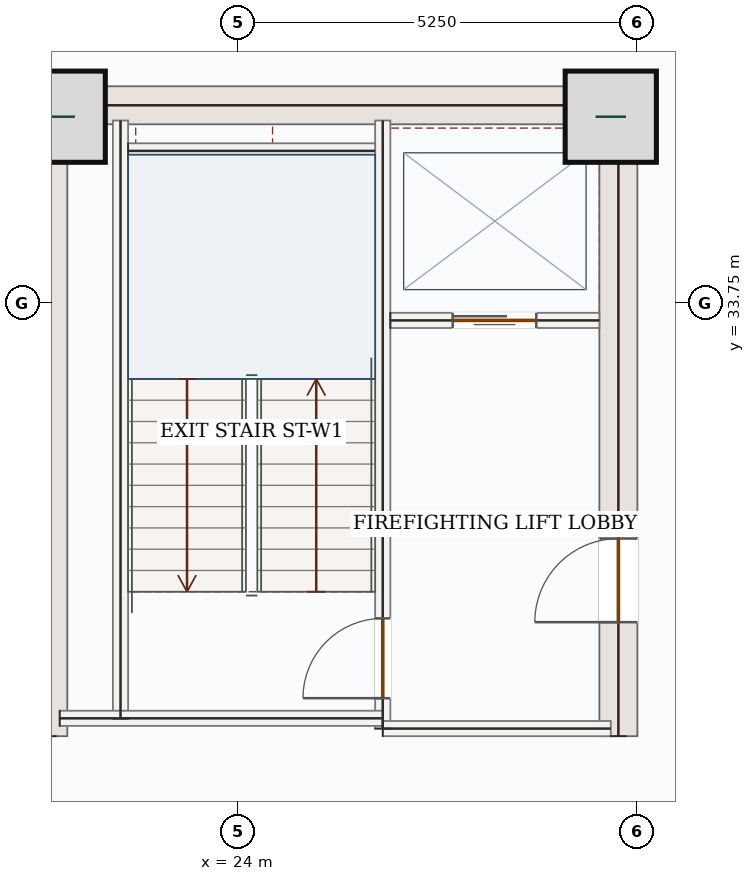
"""IFC4 building model, lengths in metres.
Left out: names, types, materials, properties, quantities, classifications, styles, units other than length and angle.
Written with IfcOpenShell. Run it as: python <this file> out.ifc"""

import sys

from ifc_helpers import new_model, si_unit, direction, frame, frame_2d, origin, origin_2d, place, context, subcontext, project, spatial, rectangle, extrude, source, transform, mapped, element, fill, save


model = new_model("IFC4")
c1 = context("Model", 3, precision=1e-05, world=origin(), true_north=direction((0.0, 1.0)))
c2 = subcontext(c1, "Body", "Model", "MODEL_VIEW")
j1 = project(units=[si_unit("LENGTHUNIT", "METRE"), si_unit("PLANEANGLEUNIT", "RADIAN")], contexts=[c1])
p1 = place(None, origin())
s1 = spatial("IfcSite", under=j1, at=p1, CompositionType="ELEMENT")
p2 = place(p1, origin())
s2 = spatial("IfcBuilding", under=s1, at=p2, CompositionType="ELEMENT")
p3 = place(p2, frame((0.0, 0.0, 186.3)))
s3 = spatial("IfcBuildingStorey", under=s2, at=p3, CompositionType="ELEMENT", Elevation=186.3)
m1 = source(origin(), c2, "Body", "SweptSolid", [
    extrude(rectangle(XDim=8.55, YDim=0.5, at=frame_2d((4.275, 0.0))), origin(), (0.0, 0.0, 1.0), 3.62),
])
p4 = place(p3, frame((21.5, 28.05, 0.0), z_axis=(0.0, 0.0, 1.0), x_axis=(0.0, 1.0, 0.0)))
e1 = element("IfcWall", 1, at=p4, inside=s3, PredefinedType="SHEAR", context=c2, shape_type="MappedRepresentation", body=[
    mapped(m1, transform((0.0, 0.0, 0.0), x_axis=(1.0, 0.0, 0.0), y_axis=(0.0, 1.0, 0.0), z_axis=(0.0, 0.0, 1.0), scale=1.0)),
])
p5 = place(p3, frame((29.0, 28.05, 0.0), z_axis=(0.0, 0.0, 1.0), x_axis=(0.0, 1.0, 0.0)))
e2 = element("IfcWall", 2, at=p5, inside=s3, PredefinedType="SHEAR", context=c2, shape_type="SweptSolid", body=[
    extrude(rectangle(XDim=8.55, YDim=0.5, at=frame_2d((4.275, 0.0))), origin(), (0.0, 0.0, 1.0), 3.62),
])
p6 = place(p5, frame((1.5, 0.0, 0.0)))
e3 = element("IfcOpeningElement", 3, at=p6, cuts=e2, PredefinedType="OPENING", context=c2, shape_type="SweptSolid", body=[
    extrude(rectangle(XDim=1.1, YDim=2.2, at=frame_2d((0.55, 1.1))), frame((0.0, 0.26, 0.0), z_axis=(0.0, -1.0, 0.0), x_axis=(1.0, 0.0, 0.0)), (0.0, 0.0, 1.0), 0.52),
])
m2 = source(origin(), c2, "Body", "SweptSolid", [
    extrude(rectangle(XDim=7.0, YDim=0.5, at=frame_2d((3.5, 0.0))), origin(), (0.0, 0.0, 1.0), 3.62),
])
p7 = place(p3, frame((21.75, 36.35, 0.0), z_axis=(0.0, 0.0, 1.0), x_axis=(1.0, 0.0, 0.0)))
e4 = element("IfcWall", 4, at=p7, inside=s3, PredefinedType="SHEAR", context=c2, shape_type="MappedRepresentation", body=[
    mapped(m2, transform((0.0, 0.0, 0.0), x_axis=(1.0, 0.0, 0.0), y_axis=(0.0, 1.0, 0.0), z_axis=(0.0, 0.0, 1.0), scale=1.0)),
])
m3 = source(origin(), c2, "Body", "SweptSolid", [
    extrude(rectangle(XDim=1.2, YDim=1.2, at=origin_2d()), origin(), (0.0, 0.0, 1.0), 3.9),
])
for number, where, z_axis, x_axis in (
    (5, (21.65, 36.2, 0.0), (0.0, 0.0, 1.0), (1.0, 0.0, 0.0)),
    (6, (28.9, 36.2, 0.0), (0.0, 0.0, 1.0), (1.0, 0.0, 0.0)),
):
    element("IfcColumn", number, at=place(p3, frame(where, z_axis=z_axis, x_axis=x_axis)), inside=s3, PredefinedType="COLUMN", context=c2, shape_type="MappedRepresentation", body=[
        mapped(m3, transform((0.0, 0.0, 0.0), x_axis=(1.0, 0.0, 0.0), y_axis=(0.0, 1.0, 0.0), z_axis=(0.0, 0.0, 1.0), scale=1.0)),
    ])
m4 = source(origin(), c2, "Body", "SweptSolid", [
    extrude(rectangle(XDim=5.258, YDim=0.28, at=frame_2d((2.629, 0.0))), origin(), (0.0, 0.0, 1.0), 3.62),
])
p8 = place(p3, frame((18.94, 35.542, 0.0), z_axis=(0.0, 0.0, 1.0), x_axis=(0.707106781187, 0.707106781187, 0.0)))
e7 = element("IfcWall", 7, at=p8, inside=s3, PredefinedType="SOLIDWALL", context=c2, shape_type="MappedRepresentation", body=[
    mapped(m4, transform((0.0, 0.0, 0.0), x_axis=(1.0, 0.0, 0.0), y_axis=(0.0, 1.0, 0.0), z_axis=(0.0, 0.0, 1.0), scale=1.0)),
])
m5 = source(origin(), c2, "Body", "SweptSolid", [
    extrude(rectangle(XDim=7.87, YDim=0.2, at=frame_2d((3.935, 0.0))), origin(), (0.0, 0.0, 1.0), 3.62),
])
p9 = place(p3, frame((22.45, 28.28, 0.0), z_axis=(0.0, 0.0, 1.0), x_axis=(0.0, 1.0, 0.0)))
e8 = element("IfcWall", 8, at=p9, inside=s3, PredefinedType="SOLIDWALL", context=c2, shape_type="MappedRepresentation", body=[
    mapped(m5, transform((0.0, 0.0, 0.0), x_axis=(1.0, 0.0, 0.0), y_axis=(0.0, 1.0, 0.0), z_axis=(0.0, 0.0, 1.0), scale=1.0)),
])
p10 = place(p3, frame((25.9, 28.15, 0.0), z_axis=(0.0, 0.0, 1.0), x_axis=(0.0, 1.0, 0.0)))
e9 = element("IfcWall", 9, at=p10, inside=s3, PredefinedType="SOLIDWALL", context=c2, shape_type="SweptSolid", body=[
    extrude(rectangle(XDim=8.0, YDim=0.2, at=frame_2d((4.0, 0.0))), origin(), (0.0, 0.0, 1.0), 3.62),
])
p11 = place(p10, frame((0.4, 0.0, 0.0)))
e10 = element("IfcOpeningElement", 10, at=p11, cuts=e9, PredefinedType="OPENING", context=c2, shape_type="SweptSolid", body=[
    extrude(rectangle(XDim=1.05, YDim=2.15, at=frame_2d((0.525, 1.075))), frame((0.0, 0.11, 0.0), z_axis=(0.0, -1.0, 0.0), x_axis=(1.0, 0.0, 0.0)), (0.0, 0.0, 1.0), 0.22),
])
m6 = source(origin(), c2, "Body", "SweptSolid", [
    extrude(rectangle(XDim=4.25, YDim=0.2, at=frame_2d((2.125, 0.0))), origin(), (0.0, 0.0, 1.0), 3.62),
])
p12 = place(p3, frame((21.65, 28.285, 0.0), z_axis=(0.0, 0.0, 1.0), x_axis=(1.0, 0.0, 0.0)))
e11 = element("IfcWall", 11, at=p12, inside=s3, PredefinedType="SOLIDWALL", context=c2, shape_type="MappedRepresentation", body=[
    mapped(m6, transform((0.0, 0.0, 0.0), x_axis=(1.0, 0.0, 0.0), y_axis=(0.0, 1.0, 0.0), z_axis=(0.0, 0.0, 1.0), scale=1.0)),
])
m7 = source(origin(), c2, "Body", "SweptSolid", [
    extrude(rectangle(XDim=3.0, YDim=0.2, at=frame_2d((1.5, 0.0))), origin(), (0.0, 0.0, 1.0), 3.62),
])
p13 = place(p3, frame((25.9, 28.15, 0.0), z_axis=(0.0, 0.0, 1.0), x_axis=(1.0, 0.0, 0.0)))
e12 = element("IfcWall", 12, at=p13, inside=s3, PredefinedType="SOLIDWALL", context=c2, shape_type="MappedRepresentation", body=[
    mapped(m7, transform((0.0, 0.0, 0.0), x_axis=(1.0, 0.0, 0.0), y_axis=(0.0, 1.0, 0.0), z_axis=(0.0, 0.0, 1.0), scale=1.0)),
])
m8 = source(origin(), c2, "Body", "SweptSolid", [
    extrude(rectangle(XDim=3.25, YDim=0.2, at=frame_2d((1.625, 0.0))), origin(), (0.0, 0.0, 1.0), 3.62),
])
p14 = place(p3, frame((22.55, 35.75, 0.0), z_axis=(0.0, 0.0, 1.0), x_axis=(1.0, 0.0, 0.0)))
e13 = element("IfcWall", 13, at=p14, inside=s3, PredefinedType="SOLIDWALL", context=c2, shape_type="MappedRepresentation", body=[
    mapped(m8, transform((0.0, 0.0, 0.0), x_axis=(1.0, 0.0, 0.0), y_axis=(0.0, 1.0, 0.0), z_axis=(0.0, 0.0, 1.0), scale=1.0)),
])
p15 = place(p3, frame((26.0, 33.52, 0.0), z_axis=(0.0, 0.0, 1.0), x_axis=(1.0, 0.0, 0.0)))
e14 = element("IfcWall", 14, at=p15, inside=s3, PredefinedType="SOLIDWALL", context=c2, shape_type="SweptSolid", body=[
    extrude(rectangle(XDim=2.75, YDim=0.2, at=frame_2d((1.375, 0.0))), origin(), (0.0, 0.0, 1.0), 3.62),
])
p16 = place(p15, frame((0.82, 0.0, 0.0)))
e15 = element("IfcOpeningElement", 15, at=p16, cuts=e14, PredefinedType="OPENING", context=c2, shape_type="SweptSolid", body=[
    extrude(rectangle(XDim=1.1, YDim=2.15, at=frame_2d((0.55, 1.075))), frame((0.0, 0.11, 0.0), z_axis=(0.0, -1.0, 0.0), x_axis=(1.0, 0.0, 0.0)), (0.0, 0.0, 1.0), 0.22),
])
m9 = source(origin(), c2, "Body", "SweptSolid", [
    extrude(rectangle(XDim=1.05, YDim=2.15, at=frame_2d((0.525, 1.075))), frame((0.0, 0.025, 0.0), z_axis=(0.0, -1.0, 0.0), x_axis=(1.0, 0.0, 0.0)), (0.0, 0.0, 1.0), 0.05),
])
p17 = place(p11, origin())
e16 = element("IfcDoor", 16, at=p17, inside=s3, OperationType="SINGLE_SWING_LEFT", PredefinedType="DOOR", context=c2, shape_type="MappedRepresentation", body=[
    mapped(m9, transform((0.0, 0.0, 0.0), x_axis=(1.0, 0.0, 0.0), y_axis=(0.0, 1.0, 0.0), z_axis=(0.0, 0.0, 1.0), scale=1.0)),
])
fill(e10, e16)
m10 = source(origin(), c2, "Body", "SweptSolid", [
    extrude(rectangle(XDim=1.1, YDim=2.15, at=frame_2d((0.55, 1.075))), frame((0.0, 0.025, 0.0), z_axis=(0.0, -1.0, 0.0), x_axis=(1.0, 0.0, 0.0)), (0.0, 0.0, 1.0), 0.05),
])
p18 = place(p16, origin())
e17 = element("IfcDoor", 17, at=p18, inside=s3, OperationType="DOUBLE_DOOR_SLIDING", PredefinedType="DOOR", context=c2, shape_type="MappedRepresentation", body=[
    mapped(m10, transform((0.0, 0.0, 0.0), x_axis=(1.0, 0.0, 0.0), y_axis=(0.0, 1.0, 0.0), z_axis=(0.0, 0.0, 1.0), scale=1.0)),
])
fill(e15, e17)
m11 = source(origin(), c2, "Body", "SweptSolid", [
    extrude(rectangle(XDim=1.1, YDim=2.2, at=frame_2d((0.55, 1.1))), frame((0.0, 0.025, 0.0), z_axis=(0.0, -1.0, 0.0), x_axis=(1.0, 0.0, 0.0)), (0.0, 0.0, 1.0), 0.05),
])
p19 = place(p6, origin())
e18 = element("IfcDoor", 18, at=p19, inside=s3, OperationType="SINGLE_SWING_LEFT", PredefinedType="DOOR", context=c2, shape_type="MappedRepresentation", body=[
    mapped(m11, transform((0.0, 0.0, 0.0), x_axis=(1.0, 0.0, 0.0), y_axis=(0.0, 1.0, 0.0), z_axis=(0.0, 0.0, 1.0), scale=1.0)),
])
fill(e3, e18)
save(model, sys.argv[1])
